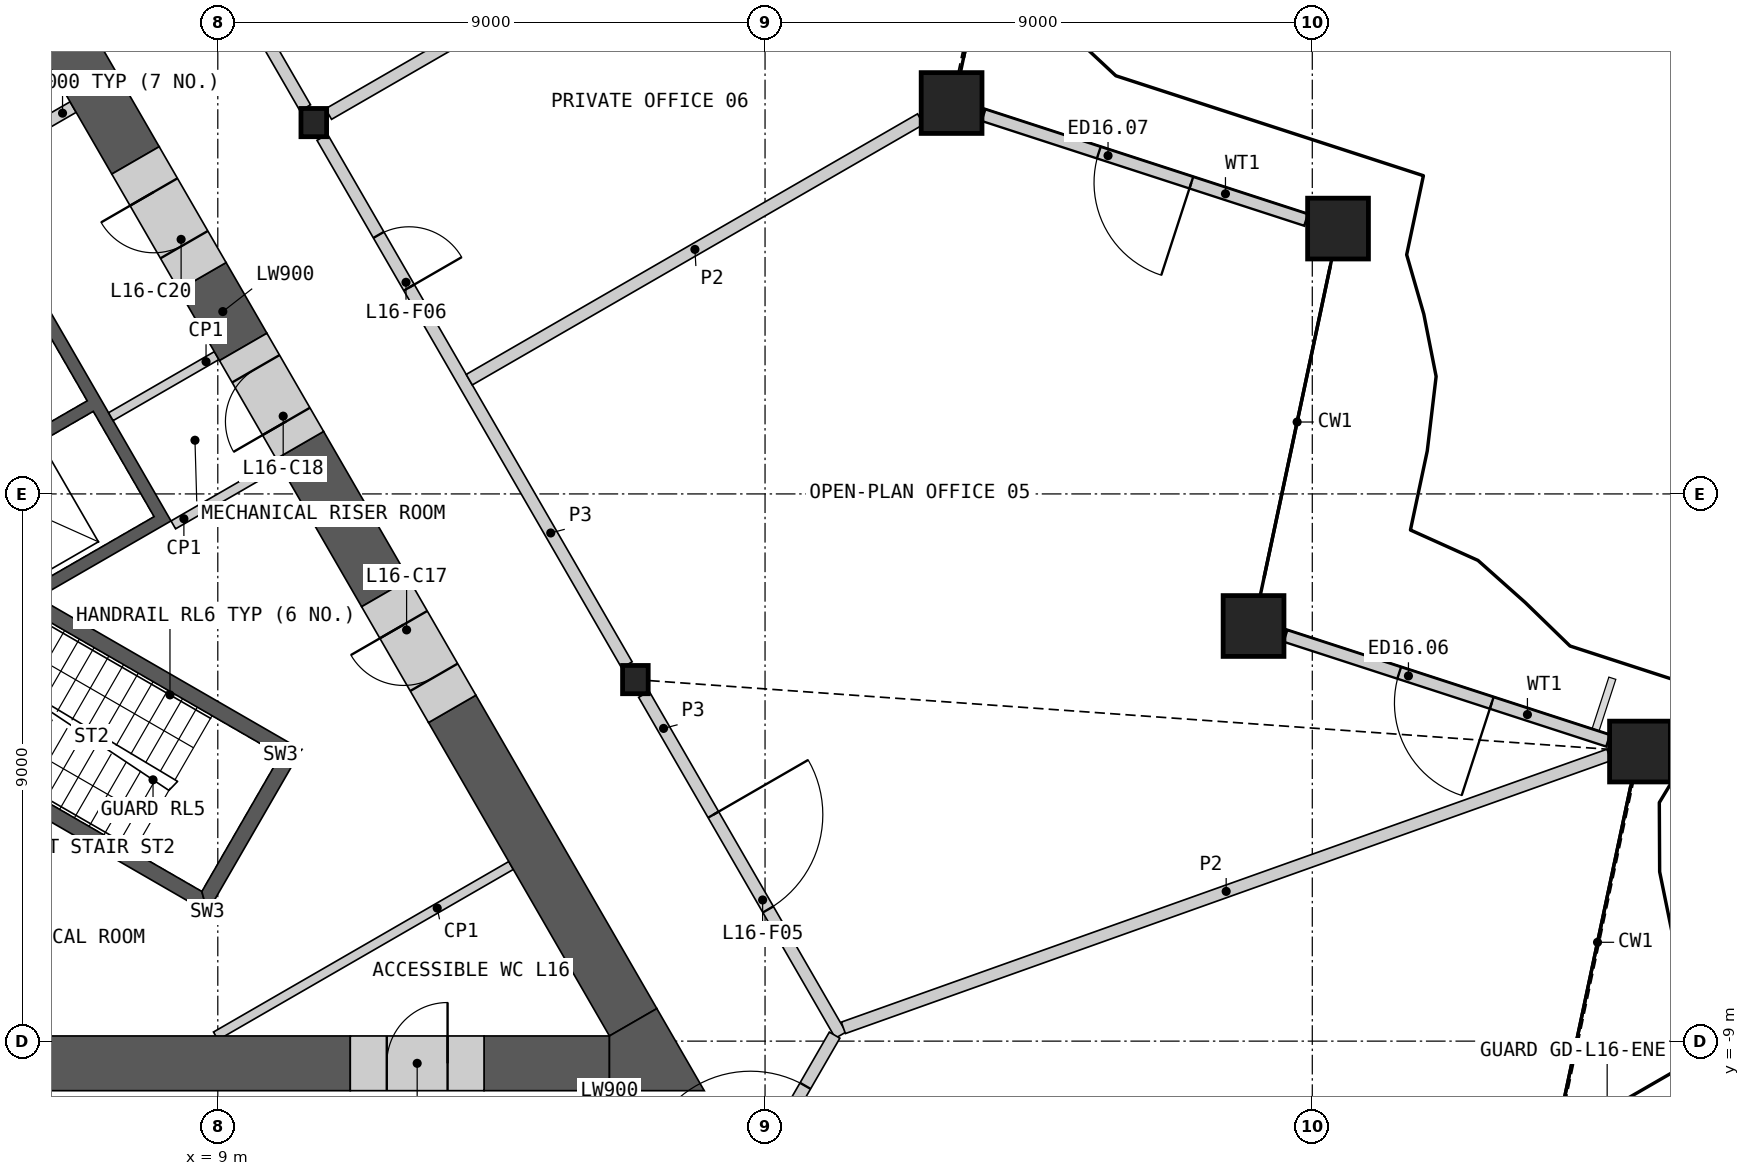
"""IFC4 building model, lengths in metres.
Left out: names, types, materials, properties, quantities, classifications, styles, units other than length and angle.
Written with IfcOpenShell. Run it as: python <this file> out.ifc"""

import sys

from ifc_helpers import new_model, si_unit, direction, frame, frame_2d, origin, origin_2d, place, context, subcontext, project, spatial, polyline, rectangle, hollow_rectangle, i_section, outline, extrude, element, fill, save


model = new_model("IFC4")
c1 = context("Model", 3, precision=1e-05, world=origin(), true_north=direction((0.0, 1.0)))
c2 = subcontext(c1, "Body", "Model", "MODEL_VIEW")
j1 = project(units=[si_unit("LENGTHUNIT", "METRE"), si_unit("PLANEANGLEUNIT", "RADIAN")], contexts=[c1])
p1 = place(None, origin())
s1 = spatial("IfcSite", under=j1, at=p1, CompositionType="ELEMENT")
p2 = place(p1, origin())
s2 = spatial("IfcBuilding", under=s1, at=p2, CompositionType="ELEMENT")
p3 = place(p2, frame((0.0, 0.0, 76.2)))
s3 = spatial("IfcBuildingStorey", under=s2, at=p3, CompositionType="ELEMENT", Elevation=76.2)
for number, where, z_axis, x_axis in (
    (1, (32.389, -4.237, 0.0), (0.0, 0.0, 1.0), (1.0, 0.0, 0.0)),
    (2, (26.034, -2.172, 0.0), (0.0, 0.0, 1.0), (1.0, 0.0, 0.0)),
    (3, (27.423, 4.364, 0.0), (0.0, 0.0, 1.0), (1.0, 0.0, 0.0)),
    (4, (21.068, 6.429, 0.0), (0.0, 0.0, 1.0), (1.0, 0.0, 0.0)),
):
    element("IfcColumn", number, at=place(p3, frame(where, z_axis=z_axis, x_axis=x_axis)), inside=s3, PredefinedType="COLUMN", context=c2, shape_type="SweptSolid", body=[
        extrude(hollow_rectangle(XDim=1.0, YDim=1.0, WallThickness=0.07, at=origin_2d()), origin(), (0.0, 0.0, 1.0), 4.2),
    ])
for number, where, z_axis, x_axis in (
    (5, (15.868, -3.054, 0.0), (0.0, 0.0, 1.0), (1.0, 0.0, 0.0)),
    (6, (10.578, 6.107, 0.0), (0.0, 0.0, 1.0), (1.0, 0.0, 0.0)),
):
    element("IfcColumn", number, at=place(p3, frame(where, z_axis=z_axis, x_axis=x_axis)), inside=s3, PredefinedType="COLUMN", context=c2, shape_type="SweptSolid", body=[
        extrude(i_section(OverallWidth=0.421, OverallDepth=0.465, WebThickness=0.045, FlangeThickness=0.072, at=origin_2d()), origin(), (0.0, 0.0, 1.0), 4.2),
    ])
p4 = place(p3, frame((31.865, -4.06, 0.0), z_axis=(0.0, 0.0, 1.0), x_axis=(-0.951054004345, 0.309024725255, 0.0)))
e7 = element("IfcWall", 7, at=p4, inside=s3, PredefinedType="SOLIDWALL", context=c2, shape_type="SweptSolid", body=[
    extrude(rectangle(XDim=5.579, YDim=0.2, at=frame_2d((2.79, 0.0))), origin(), (0.0, 0.0, 1.0), 3.189),
])
p5 = place(p4, frame((2.012, 0.0, 0.0)))
e8 = element("IfcOpeningElement", 8, at=p5, cuts=e7, PredefinedType="OPENING", context=c2, shape_type="SweptSolid", body=[
    extrude(rectangle(XDim=1.6, YDim=2.4, at=frame_2d((0.8, 1.2))), frame((0.0, 0.11, 0.0), z_axis=(0.0, -1.0, 0.0), x_axis=(1.0, 0.0, 0.0)), (0.0, 0.0, 1.0), 0.22),
])
p6 = place(p3, frame((26.899, 4.505, 0.0), z_axis=(0.0, 0.0, 1.0), x_axis=(-0.951054004345, 0.309024725255, 0.0)))
e9 = element("IfcWall", 9, at=p6, inside=s3, PredefinedType="SOLIDWALL", context=c2, shape_type="SweptSolid", body=[
    extrude(rectangle(XDim=5.579, YDim=0.2, at=frame_2d((2.79, 0.0))), origin(), (0.0, 0.0, 1.0), 3.189),
])
p7 = place(p6, frame((1.985, 0.0, 0.0)))
e10 = element("IfcOpeningElement", 10, at=p7, cuts=e9, PredefinedType="OPENING", context=c2, shape_type="SweptSolid", body=[
    extrude(rectangle(XDim=1.6, YDim=2.4, at=frame_2d((0.8, 1.2))), frame((0.0, 0.11, 0.0), z_axis=(0.0, -1.0, 0.0), x_axis=(1.0, 0.0, 0.0)), (0.0, 0.0, 1.0), 0.22),
])
p8 = place(p3, origin())
e11 = element("IfcWall", 11, at=p8, inside=s3, PredefinedType="SHEAR", context=c2, shape_type="SweptSolid", body=[
    extrude(outline(polyline([(2.66, 4.192), (4.831, 5.445), (8.231, -0.444), (6.061, -1.697), (5.96, -1.524), (7.952, -0.374), (6.952, 1.358), (4.96, 0.208), (4.861, 0.381), (6.852, 1.531), (5.852, 3.263), (3.861, 2.113), (3.76, 2.287), (5.752, 3.437), (4.752, 5.169), (2.76, 4.019), (2.66, 4.192)])), origin(), (0.0, 0.0, 1.0), 3.8),
])
p9 = place(p3, frame((4.881, 5.358, 0.0), z_axis=(0.0, 0.0, 1.0), x_axis=(0.866035824272, 0.499981950752, 0.0)))
e12 = element("IfcWall", 12, at=p9, inside=s3, PredefinedType="SHEAR", context=c2, shape_type="SweptSolid", body=[
    extrude(rectangle(XDim=2.009, YDim=0.2, at=frame_2d((1.004, 0.0))), origin(), (0.0, 0.0, 1.0), 3.8),
])
p10 = place(p3, origin())
e13 = element("IfcWall", 13, at=p10, inside=s3, PredefinedType="SHEAR", context=c2, shape_type="SweptSolid", body=[
    extrude(outline(polyline([(3.763, -3.956), (8.83, -6.881), (8.738, -6.539), (3.888, -3.739), (3.763, -3.956)])), origin(), (0.0, 0.0, 1.0), 3.8),
])
p11 = place(p3, origin())
e14 = element("IfcWall", 14, at=p11, inside=s3, PredefinedType="SHEAR", context=c2, shape_type="SweptSolid", body=[
    extrude(outline(polyline([(8.83, -6.881), (10.374, -4.206), (10.032, -4.298), (8.738, -6.539), (8.83, -6.881)])), origin(), (0.0, 0.0, 1.0), 3.8),
])
p12 = place(p3, origin())
e15 = element("IfcWall", 15, at=p12, inside=s3, PredefinedType="SHEAR", context=c2, shape_type="SweptSolid", body=[
    extrude(outline(polyline([(10.032, -4.298), (10.374, -4.206), (5.307, -1.281), (5.182, -1.498), (10.032, -4.298)])), origin(), (0.0, 0.0, 1.0), 3.8),
])
p13 = place(p3, frame((8.268, -0.509, 0.0), z_axis=(0.0, 0.0, 1.0), x_axis=(0.866035824272, 0.499981950752, 0.0)))
e16 = element("IfcWall", 16, at=p13, inside=s3, PredefinedType="PARTITIONING", context=c2, shape_type="SweptSolid", body=[
    extrude(rectangle(XDim=2.009, YDim=0.15, at=frame_2d((1.004, 0.0))), origin(), (0.0, 0.0, 1.0), 3.8),
])
p14 = place(p3, frame((13.823, -6.111, 0.0), z_axis=(0.0, 0.0, 1.0), x_axis=(-0.866026802741, -0.499997576928, 0.0)))
e17 = element("IfcWall", 17, at=p14, inside=s3, PredefinedType="PARTITIONING", context=c2, shape_type="SweptSolid", body=[
    extrude(rectangle(XDim=5.607, YDim=0.15, at=frame_2d((2.804, 0.0))), origin(), (0.0, 0.0, 1.0), 3.8),
])
p15 = place(p3, frame((8.981, 2.275, 0.0), z_axis=(0.0, 0.0, 1.0), x_axis=(-0.866013584312, -0.500020471368, 0.0)))
e18 = element("IfcWall", 18, at=p15, inside=s3, PredefinedType="PARTITIONING", context=c2, shape_type="SweptSolid", body=[
    extrude(rectangle(XDim=2.009, YDim=0.15, at=frame_2d((1.005, 0.0))), origin(), (0.0, 0.0, 1.0), 3.8),
])
p16 = place(p3, frame((-4.371, -9.365, 0.0), z_axis=(0.0, 0.0, 1.0), x_axis=(1.0, 0.0, 0.0)))
e19 = element("IfcWall", 19, at=p16, inside=s3, PredefinedType="SHEAR", context=c2, shape_type="SweptSolid", body=[
    extrude(rectangle(XDim=15.55, YDim=0.9, at=frame_2d((7.775, 0.0))), origin(), (0.0, 0.0, 1.0), 3.8),
])
p17 = place(p3, frame((13.379, -9.365, 0.0), z_axis=(0.0, 0.0, 1.0), x_axis=(1.0, 0.0, 0.0)))
e20 = element("IfcWall", 20, at=p17, inside=s3, PredefinedType="SHEAR", context=c2, shape_type="SweptSolid", body=[
    extrude(rectangle(XDim=2.062, YDim=0.9, at=frame_2d((1.031, 0.0))), origin(), (0.0, 0.0, 1.0), 3.8),
])
p18 = place(p3, frame((7.646, 5.486, 0.0), z_axis=(0.0, 0.0, 1.0), x_axis=(-0.499982660725, 0.866035414388, 0.0)))
e21 = element("IfcWall", 21, at=p18, inside=s3, PredefinedType="SHEAR", context=c2, shape_type="SweptSolid", body=[
    extrude(rectangle(XDim=10.206, YDim=0.9, at=frame_2d((5.103, 0.0))), origin(), (0.0, 0.0, 1.0), 3.8),
])
p19 = place(p3, frame((15.831, -8.69, 0.0), z_axis=(0.0, 0.0, 1.0), x_axis=(-0.499999419053, 0.866025739194, 0.0)))
e22 = element("IfcWall", 22, at=p19, inside=s3, PredefinedType="SHEAR", context=c2, shape_type="SweptSolid", body=[
    extrude(rectangle(XDim=5.952, YDim=0.9, at=frame_2d((2.976, 0.0))), origin(), (0.0, 0.0, 1.0), 3.8),
])
p20 = place(p3, frame((11.755, -1.63, 0.0), z_axis=(0.0, 0.0, 1.0), x_axis=(-0.499943114462, 0.866058244174, 0.0)))
e23 = element("IfcWall", 23, at=p20, inside=s3, PredefinedType="SHEAR", context=c2, shape_type="SweptSolid", body=[
    extrude(rectangle(XDim=2.809, YDim=0.9, at=frame_2d((1.405, 0.0))), origin(), (0.0, 0.0, 1.0), 3.8),
])
p21 = place(p3, frame((9.418, 2.418, 0.0), z_axis=(0.0, 0.0, 1.0), x_axis=(-0.49995335277, 0.8660523339, 0.0)))
e24 = element("IfcWall", 24, at=p21, inside=s3, PredefinedType="SHEAR", context=c2, shape_type="SweptSolid", body=[
    extrude(rectangle(XDim=1.343, YDim=0.9, at=frame_2d((0.671, 0.0))), origin(), (0.0, 0.0, 1.0), 3.8),
])
p22 = place(p3, origin())
e25 = element("IfcWall", 25, at=p22, inside=s3, PredefinedType="SHEAR", context=c2, shape_type="SweptSolid", body=[
    extrude(outline(polyline([(15.441, -9.815), (15.441, -8.915), (16.221, -8.465), (17.0, -9.815), (15.441, -9.815)])), origin(), (0.0, 0.0, 1.0), 3.8),
])
p23 = place(p3, frame((11.179, -9.365, 0.0), z_axis=(0.0, 0.0, 1.0), x_axis=(1.0, 0.0, 0.0)))
e26 = element("IfcWall", 26, at=p23, inside=s3, PredefinedType="SHEAR", context=c2, shape_type="SweptSolid", body=[
    extrude(rectangle(XDim=2.2, YDim=0.9, at=frame_2d((1.1, 0.0))), origin(), (0.0, 0.0, 1.0), 3.8),
])
p24 = place(p23, frame((0.6, 0.0, 0.0)))
e27 = element("IfcOpeningElement", 27, at=p24, cuts=e26, PredefinedType="OPENING", context=c2, shape_type="SweptSolid", body=[
    extrude(rectangle(XDim=1.0, YDim=2.1, at=frame_2d((0.5, 1.05))), frame((0.0, 0.46, 0.0), z_axis=(0.0, -1.0, 0.0), x_axis=(1.0, 0.0, 0.0)), (0.0, 0.0, 1.0), 0.92),
])
p25 = place(p3, frame((12.855, -3.536, 0.0), z_axis=(0.0, 0.0, 1.0), x_axis=(-0.50002983664, 0.866008176907, 0.0)))
e28 = element("IfcWall", 28, at=p25, inside=s3, PredefinedType="SHEAR", context=c2, shape_type="SweptSolid", body=[
    extrude(rectangle(XDim=2.2, YDim=0.9, at=frame_2d((1.1, 0.0))), origin(), (0.0, 0.0, 1.0), 3.8),
])
p26 = place(p25, frame((0.6, 0.0, 0.0)))
e29 = element("IfcOpeningElement", 29, at=p26, cuts=e28, PredefinedType="OPENING", context=c2, shape_type="SweptSolid", body=[
    extrude(rectangle(XDim=1.0, YDim=2.1, at=frame_2d((0.5, 1.05))), frame((0.0, 0.46, 0.0), z_axis=(0.0, -1.0, 0.0), x_axis=(1.0, 0.0, 0.0)), (0.0, 0.0, 1.0), 0.92),
])
p27 = place(p3, frame((10.35, 0.803, 0.0), z_axis=(0.0, 0.0, 1.0), x_axis=(-0.500081290722, 0.865978465477, 0.0)))
e30 = element("IfcWall", 30, at=p27, inside=s3, PredefinedType="SHEAR", context=c2, shape_type="SweptSolid", body=[
    extrude(rectangle(XDim=1.865, YDim=0.9, at=frame_2d((0.933, 0.0))), origin(), (0.0, 0.0, 1.0), 3.8),
])
p28 = place(p27, frame((0.45, 0.0, 0.0)))
e31 = element("IfcOpeningElement", 31, at=p28, cuts=e30, PredefinedType="OPENING", context=c2, shape_type="SweptSolid", body=[
    extrude(rectangle(XDim=1.0, YDim=2.1, at=frame_2d((0.5, 1.05))), frame((0.0, 0.46, 0.0), z_axis=(0.0, -1.0, 0.0), x_axis=(1.0, 0.0, 0.0)), (0.0, 0.0, 1.0), 0.92),
])
p29 = place(p3, frame((8.747, 3.58, 0.0), z_axis=(0.0, 0.0, 1.0), x_axis=(-0.50002983664, 0.866008176907, 0.0)))
e32 = element("IfcWall", 32, at=p29, inside=s3, PredefinedType="SHEAR", context=c2, shape_type="SweptSolid", body=[
    extrude(rectangle(XDim=2.2, YDim=0.9, at=frame_2d((1.1, 0.0))), origin(), (0.0, 0.0, 1.0), 3.8),
])
p30 = place(p29, frame((0.6, 0.0, 0.0)))
e33 = element("IfcOpeningElement", 33, at=p30, cuts=e32, PredefinedType="OPENING", context=c2, shape_type="SweptSolid", body=[
    extrude(rectangle(XDim=1.0, YDim=2.1, at=frame_2d((0.5, 1.05))), frame((0.0, 0.46, 0.0), z_axis=(0.0, -1.0, 0.0), x_axis=(1.0, 0.0, 0.0)), (0.0, 0.0, 1.0), 0.92),
])
p31 = place(p3, frame((5.429, 15.026, 0.0), z_axis=(0.0, 0.0, 1.0), x_axis=(0.50001002959, -0.86601961312, 0.0)))
e34 = element("IfcWall", 34, at=p31, inside=s3, PredefinedType="PARTITIONING", context=c2, shape_type="SweptSolid", body=[
    extrude(rectangle(XDim=10.019, YDim=0.2, at=frame_2d((5.009, 0.0))), origin(), (0.0, 0.0, 1.0), 3.8),
])
p32 = place(p31, frame((4.76, 0.0, 0.0)))
e35 = element("IfcOpeningElement", 35, at=p32, cuts=e34, PredefinedType="OPENING", context=c2, shape_type="SweptSolid", body=[
    extrude(rectangle(XDim=1.0, YDim=2.1, at=frame_2d((0.5, 1.05))), frame((0.0, 0.11, 0.0), z_axis=(0.0, -1.0, 0.0), x_axis=(1.0, 0.0, 0.0)), (0.0, 0.0, 1.0), 0.22),
])
p33 = place(p3, frame((10.719, 5.865, 0.0), z_axis=(0.0, 0.0, 1.0), x_axis=(0.49999175339, -0.866030164915, 0.0)))
e36 = element("IfcWall", 36, at=p33, inside=s3, PredefinedType="PARTITIONING", context=c2, shape_type="SweptSolid", body=[
    extrude(rectangle(XDim=10.019, YDim=0.2, at=frame_2d((5.009, 0.0))), origin(), (0.0, 0.0, 1.0), 3.8),
])
p34 = place(p33, frame((1.854, 0.0, 0.0)))
e37 = element("IfcOpeningElement", 37, at=p34, cuts=e36, PredefinedType="OPENING", context=c2, shape_type="SweptSolid", body=[
    extrude(rectangle(XDim=1.0, YDim=2.1, at=frame_2d((0.5, 1.05))), frame((0.0, 0.11, 0.0), z_axis=(0.0, -1.0, 0.0), x_axis=(1.0, 0.0, 0.0)), (0.0, 0.0, 1.0), 0.22),
])
p35 = place(p3, frame((16.008, -3.296, 0.0), z_axis=(0.0, 0.0, 1.0), x_axis=(0.499984737558, -0.86603421538, 0.0)))
e38 = element("IfcWall", 38, at=p35, inside=s3, PredefinedType="PARTITIONING", context=c2, shape_type="SweptSolid", body=[
    extrude(rectangle(XDim=6.473, YDim=0.2, at=frame_2d((3.236, 0.0))), origin(), (0.0, 0.0, 1.0), 3.8),
])
p36 = place(p35, frame((2.285, 0.0, 0.0)))
e39 = element("IfcOpeningElement", 39, at=p36, cuts=e38, PredefinedType="OPENING", context=c2, shape_type="SweptSolid", body=[
    extrude(rectangle(XDim=1.8, YDim=2.1, at=frame_2d((0.9, 1.05))), frame((0.0, 0.11, 0.0), z_axis=(0.0, -1.0, 0.0), x_axis=(1.0, 0.0, 0.0)), (0.0, 0.0, 1.0), 0.22),
])
p37 = place(p3, frame((17.281, -12.128, 0.0), z_axis=(0.0, 0.0, 1.0), x_axis=(0.499958791762, 0.866049194065, 0.0)))
e40 = element("IfcWall", 40, at=p37, inside=s3, PredefinedType="PARTITIONING", context=c2, shape_type="SweptSolid", body=[
    extrude(rectangle(XDim=3.726, YDim=0.2, at=frame_2d((1.863, 0.0))), origin(), (0.0, 0.0, 1.0), 3.8),
])
p38 = place(p37, frame((0.963, 0.0, 0.0)))
e41 = element("IfcOpeningElement", 41, at=p38, cuts=e40, PredefinedType="OPENING", context=c2, shape_type="SweptSolid", body=[
    extrude(rectangle(XDim=1.8, YDim=2.1, at=frame_2d((0.9, 1.05))), frame((0.0, 0.11, 0.0), z_axis=(0.0, -1.0, 0.0), x_axis=(1.0, 0.0, 0.0)), (0.0, 0.0, 1.0), 0.22),
])
p39 = place(p3, frame((19.288, -8.781, 0.0), z_axis=(0.0, 0.0, 1.0), x_axis=(0.94194008836, 0.33578098508, 0.0)))
e42 = element("IfcWall", 42, at=p39, inside=s3, PredefinedType="PARTITIONING", context=c2, shape_type="SweptSolid", body=[
    extrude(rectangle(XDim=13.367, YDim=0.2, at=frame_2d((6.684, 0.0))), origin(), (0.0, 0.0, 1.0), 2.885),
])
p40 = place(p3, frame((10.821, 6.247, 0.0), z_axis=(0.0, 0.0, 1.0), x_axis=(0.866026729935, 0.499997703033, 0.0)))
e43 = element("IfcWall", 43, at=p40, inside=s3, PredefinedType="PARTITIONING", context=c2, shape_type="SweptSolid", body=[
    extrude(rectangle(XDim=12.848, YDim=0.2, at=frame_2d((6.424, 0.0))), origin(), (0.0, 0.0, 1.0), 2.885),
])
p41 = place(p3, frame((13.135, 1.879, 0.0), z_axis=(0.0, 0.0, 1.0), x_axis=(0.866027626846, 0.499996149525, 0.0)))
e44 = element("IfcWall", 44, at=p41, inside=s3, PredefinedType="PARTITIONING", context=c2, shape_type="SweptSolid", body=[
    extrude(rectangle(XDim=8.571, YDim=0.2, at=frame_2d((4.285, 0.0))), origin(), (0.0, 0.0, 1.0), 2.885),
])
p42 = place(p5, origin())
e45 = element("IfcDoor", 45, at=p42, inside=s3, OperationType="DOUBLE_DOOR_SINGLE_SWING", PredefinedType="DOOR", context=c2, shape_type="SweptSolid", body=[
    extrude(rectangle(XDim=1.6, YDim=2.4, at=frame_2d((0.8, 1.2))), frame((0.0, 0.025, 0.0), z_axis=(0.0, -1.0, 0.0), x_axis=(1.0, 0.0, 0.0)), (0.0, 0.0, 1.0), 0.05),
])
fill(e8, e45)
p43 = place(p7, origin())
e46 = element("IfcDoor", 46, at=p43, inside=s3, OperationType="DOUBLE_DOOR_SINGLE_SWING", PredefinedType="DOOR", context=c2, shape_type="SweptSolid", body=[
    extrude(rectangle(XDim=1.6, YDim=2.4, at=frame_2d((0.8, 1.2))), frame((0.0, 0.025, 0.0), z_axis=(0.0, -1.0, 0.0), x_axis=(1.0, 0.0, 0.0)), (0.0, 0.0, 1.0), 0.05),
])
fill(e10, e46)
p44 = place(p24, origin())
e47 = element("IfcDoor", 47, at=p44, inside=s3, OperationType="SINGLE_SWING_RIGHT", PredefinedType="DOOR", context=c2, shape_type="SweptSolid", body=[
    extrude(rectangle(XDim=1.0, YDim=2.1, at=frame_2d((0.5, 1.05))), frame((0.0, 0.205, 0.0), z_axis=(0.0, -1.0, 0.0), x_axis=(1.0, 0.0, 0.0)), (0.0, 0.0, 1.0), 0.05),
])
fill(e27, e47)
p45 = place(p26, origin())
e48 = element("IfcDoor", 48, at=p45, inside=s3, OperationType="SINGLE_SWING_RIGHT", PredefinedType="DOOR", context=c2, shape_type="SweptSolid", body=[
    extrude(rectangle(XDim=1.0, YDim=2.1, at=frame_2d((0.5, 1.05))), frame((0.0, 0.205, 0.0), z_axis=(0.0, -1.0, 0.0), x_axis=(1.0, 0.0, 0.0)), (0.0, 0.0, 1.0), 0.05),
])
fill(e29, e48)
p46 = place(p28, origin())
e49 = element("IfcDoor", 49, at=p46, inside=s3, OperationType="SINGLE_SWING_LEFT", PredefinedType="DOOR", context=c2, shape_type="SweptSolid", body=[
    extrude(rectangle(XDim=1.0, YDim=2.1, at=frame_2d((0.5, 1.05))), frame((0.0, 0.205, 0.0), z_axis=(0.0, -1.0, 0.0), x_axis=(1.0, 0.0, 0.0)), (0.0, 0.0, 1.0), 0.05),
])
fill(e31, e49)
p47 = place(p30, origin())
e50 = element("IfcDoor", 50, at=p47, inside=s3, OperationType="SINGLE_SWING_RIGHT", PredefinedType="DOOR", context=c2, shape_type="SweptSolid", body=[
    extrude(rectangle(XDim=1.0, YDim=2.1, at=frame_2d((0.5, 1.05))), frame((0.0, 0.205, 0.0), z_axis=(0.0, -1.0, 0.0), x_axis=(1.0, 0.0, 0.0)), (0.0, 0.0, 1.0), 0.05),
])
fill(e33, e50)
p48 = place(p38, origin())
e51 = element("IfcDoor", 51, at=p48, inside=s3, OperationType="DOUBLE_DOOR_SINGLE_SWING", PredefinedType="DOOR", context=c2, shape_type="SweptSolid", body=[
    extrude(rectangle(XDim=1.8, YDim=2.1, at=frame_2d((0.9, 1.05))), frame((0.0, 0.025, 0.0), z_axis=(0.0, -1.0, 0.0), x_axis=(1.0, 0.0, 0.0)), (0.0, 0.0, 1.0), 0.05),
])
fill(e41, e51)
p49 = place(p36, origin())
e52 = element("IfcDoor", 52, at=p49, inside=s3, OperationType="DOUBLE_DOOR_SINGLE_SWING", PredefinedType="DOOR", context=c2, shape_type="SweptSolid", body=[
    extrude(rectangle(XDim=1.8, YDim=2.1, at=frame_2d((0.9, 1.05))), frame((0.0, 0.025, 0.0), z_axis=(0.0, -1.0, 0.0), x_axis=(1.0, 0.0, 0.0)), (0.0, 0.0, 1.0), 0.05),
])
fill(e39, e52)
p50 = place(p34, origin())
e53 = element("IfcDoor", 53, at=p50, inside=s3, OperationType="SINGLE_SWING_RIGHT", PredefinedType="DOOR", context=c2, shape_type="SweptSolid", body=[
    extrude(rectangle(XDim=1.0, YDim=2.1, at=frame_2d((0.5, 1.05))), frame((0.0, 0.025, 0.0), z_axis=(0.0, -1.0, 0.0), x_axis=(1.0, 0.0, 0.0)), (0.0, 0.0, 1.0), 0.05),
])
fill(e37, e53)
save(model, sys.argv[1])
